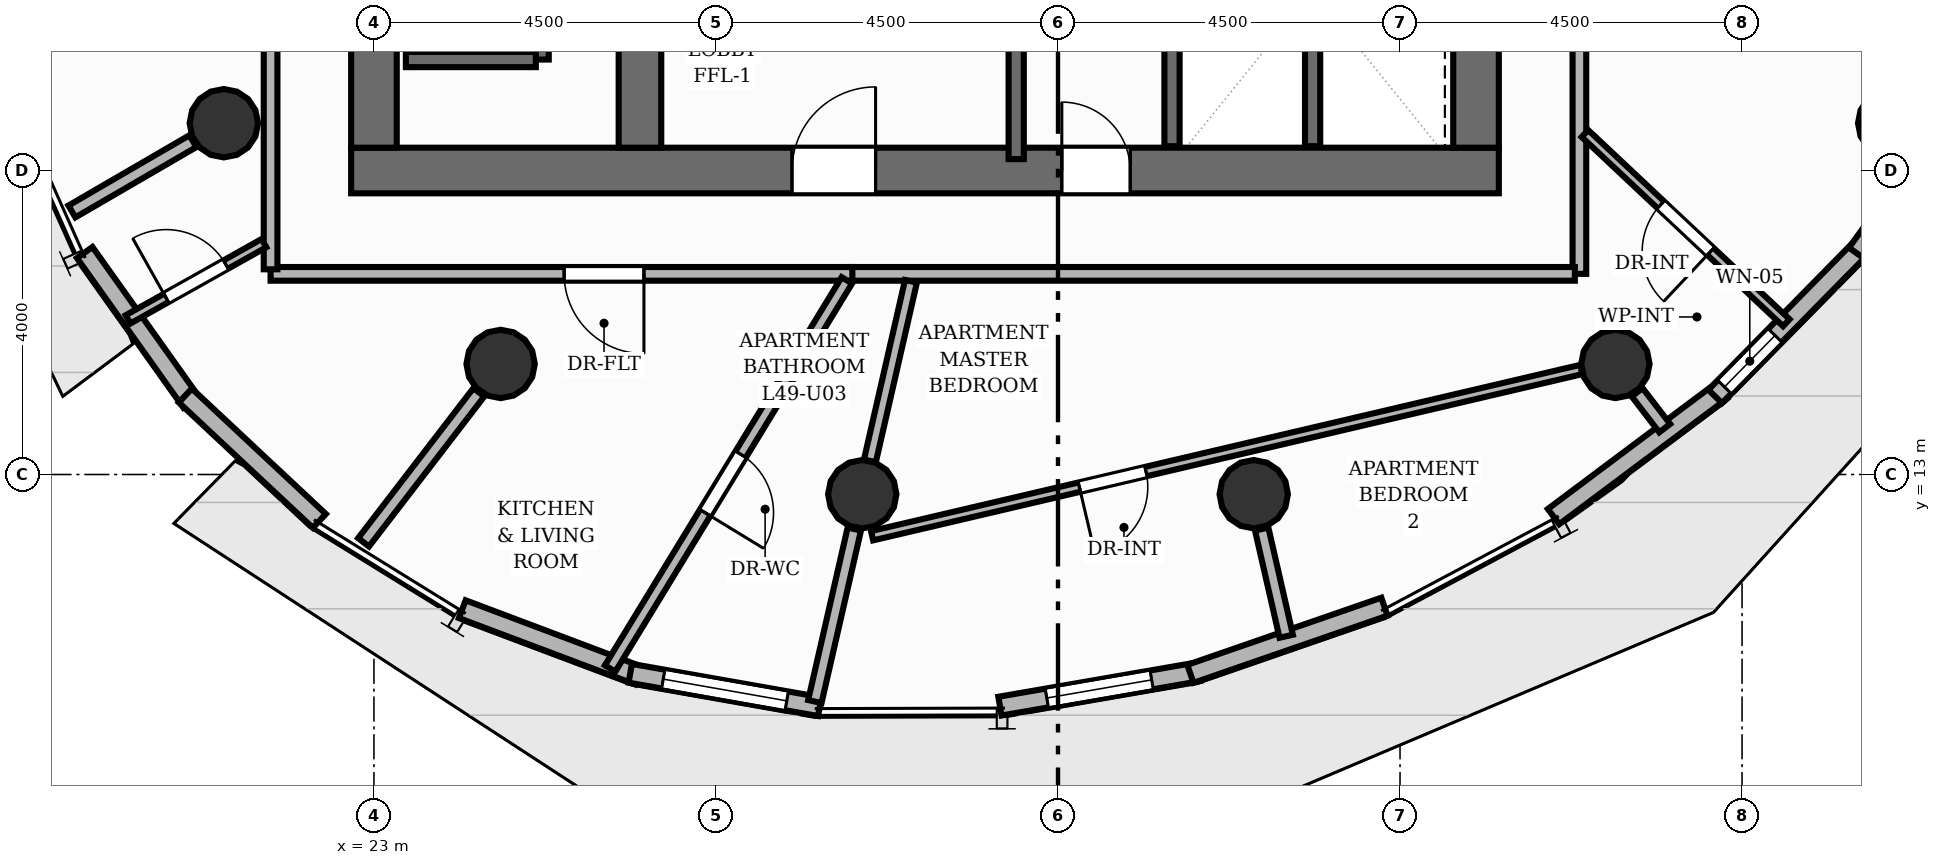
"""IFC4 building model, lengths in metres.
Left out: names, types, materials, properties, quantities, classifications, styles, units other than length and angle.
Written with IfcOpenShell. Run it as: python <this file> out.ifc"""

import sys

from ifc_helpers import new_model, si_unit, direction, frame, frame_2d, origin, origin_2d, place, context, subcontext, project, spatial, rectangle, circle, extrude, element, fill, save


model = new_model("IFC4")
c1 = context("Model", 3, precision=1e-05, world=origin(), true_north=direction((0.0, 1.0)))
c2 = subcontext(c1, "Body", "Model", "MODEL_VIEW")
j1 = project(units=[si_unit("LENGTHUNIT", "METRE"), si_unit("PLANEANGLEUNIT", "RADIAN")], contexts=[c1])
p1 = place(None, origin())
s1 = spatial("IfcSite", under=j1, at=p1, CompositionType="ELEMENT")
p2 = place(p1, origin())
s2 = spatial("IfcBuilding", under=s1, at=p2, CompositionType="ELEMENT")
p3 = place(p2, frame((0.0, 0.0, 166.24)))
s3 = spatial("IfcBuildingStorey", under=s2, at=p3, CompositionType="ELEMENT", Elevation=166.24)
p4 = place(p3, frame((22.7, 17.0, 0.0), z_axis=(0.0, 0.0, 1.0), x_axis=(1.0, 0.0, 0.0)))
e1 = element("IfcWall", 1, at=p4, inside=s3, PredefinedType="SHEAR", context=c2, shape_type="SweptSolid", body=[
    extrude(rectangle(XDim=15.1, YDim=0.6, at=frame_2d((7.55, 0.0))), origin(), (0.0, 0.0, 1.0), 3.2),
])
p5 = place(p4, frame((5.8, 0.0, 0.0)))
e2 = element("IfcOpeningElement", 2, at=p5, cuts=e1, PredefinedType="OPENING", context=c2, shape_type="SweptSolid", body=[
    extrude(rectangle(XDim=1.1, YDim=2.15, at=frame_2d((0.55, 1.075))), frame((0.0, 0.31, 0.0), z_axis=(0.0, -1.0, 0.0), x_axis=(1.0, 0.0, 0.0)), (0.0, 0.0, 1.0), 0.62),
])
p6 = place(p4, frame((9.35, 0.0, 0.0)))
e3 = element("IfcOpeningElement", 3, at=p6, cuts=e1, PredefinedType="OPENING", context=c2, shape_type="SweptSolid", body=[
    extrude(rectangle(XDim=0.9, YDim=2.1, at=frame_2d((0.45, 1.05))), frame((0.0, 0.31, 0.0), z_axis=(0.0, -1.0, 0.0), x_axis=(1.0, 0.0, 0.0)), (0.0, 0.0, 1.0), 0.62),
])
for number, where, z_axis, x_axis in (
    (4, (23.0, 17.3, 0.0), (0.0, 0.0, 1.0), (0.0, 1.0, 0.0)),
    (5, (37.5, 17.3, 0.0), (0.0, 0.0, 1.0), (0.0, 1.0, 0.0)),
):
    element("IfcWall", number, at=place(p3, frame(where, z_axis=z_axis, x_axis=x_axis)), inside=s3, PredefinedType="SHEAR", context=c2, shape_type="SweptSolid", body=[
        extrude(rectangle(XDim=13.4, YDim=0.6, at=frame_2d((6.7, 0.0))), origin(), (0.0, 0.0, 1.0), 3.2),
    ])
p7 = place(p3, frame((26.5, 17.3, 0.0), z_axis=(0.0, 0.0, 1.0), x_axis=(0.0, 1.0, 0.0)))
e6 = element("IfcWall", 6, at=p7, inside=s3, PredefinedType="SHEAR", context=c2, shape_type="SweptSolid", body=[
    extrude(rectangle(XDim=13.4, YDim=0.56, at=frame_2d((6.7, 0.0))), origin(), (0.0, 0.0, 1.0), 3.2),
])
for number, where, z_axis, x_axis in (
    (7, (21.025, 17.622, 0.0), (0.0, 0.0, 1.0), (1.0, 0.0, 0.0)),
    (8, (24.667, 14.455, 0.0), (0.0, 0.0, 1.0), (1.0, 0.0, 0.0)),
    (9, (29.425, 12.74, 0.0), (0.0, 0.0, 1.0), (1.0, 0.0, 0.0)),
    (10, (34.575, 12.74, 0.0), (0.0, 0.0, 1.0), (1.0, 0.0, 0.0)),
    (11, (39.333, 14.455, 0.0), (0.0, 0.0, 1.0), (1.0, 0.0, 0.0)),
    (12, (42.975, 17.622, 0.0), (0.0, 0.0, 1.0), (1.0, 0.0, 0.0)),
):
    element("IfcColumn", number, at=place(p3, frame(where, z_axis=z_axis, x_axis=x_axis)), inside=s3, PredefinedType="COLUMN", context=c2, shape_type="SweptSolid", body=[
        extrude(circle(Radius=0.45, at=origin_2d()), origin(), (0.0, 0.0, 1.0), 3.2),
    ])
p8 = place(p3, frame((20.594, 13.953, 0.0), z_axis=(0.0, 0.0, 1.0), x_axis=(-0.579505880656, 0.814968057217, 0.0)))
e13 = element("IfcWall", 13, at=p8, inside=s3, PredefinedType="SOLIDWALL", context=c2, shape_type="SweptSolid", body=[
    extrude(rectangle(XDim=2.415, YDim=0.25, at=frame_2d((1.208, 0.0))), origin(), (0.0, 0.0, 1.0), 2.96),
])
p9 = place(p3, frame((22.282, 12.389, 0.0), z_axis=(0.0, 0.0, 1.0), x_axis=(-0.730224222865, 0.683207570465, 0.0)))
e14 = element("IfcWall", 14, at=p9, inside=s3, PredefinedType="SOLIDWALL", context=c2, shape_type="SweptSolid", body=[
    extrude(rectangle(XDim=2.415, YDim=0.25, at=frame_2d((1.207, 0.0))), origin(), (0.0, 0.0, 1.0), 2.96),
])
p10 = place(p3, frame((26.481, 10.355, 0.0), z_axis=(0.0, 0.0, 1.0), x_axis=(-0.93586674787, 0.352354126172, 0.0)))
e15 = element("IfcWall", 15, at=p10, inside=s3, PredefinedType="SOLIDWALL", context=c2, shape_type="SweptSolid", body=[
    extrude(rectangle(XDim=2.478, YDim=0.25, at=frame_2d((1.239, 0.0))), origin(), (0.0, 0.0, 1.0), 2.96),
])
p11 = place(p3, frame((28.865, 9.945, 0.0), z_axis=(0.0, 0.0, 1.0), x_axis=(-0.984837873762, 0.173477267688, 0.0)))
e16 = element("IfcWall", 16, at=p11, inside=s3, PredefinedType="SOLIDWALL", context=c2, shape_type="SweptSolid", body=[
    extrude(rectangle(XDim=2.532, YDim=0.25, at=frame_2d((1.266, 0.0))), origin(), (0.0, 0.0, 1.0), 2.96),
])
p12 = place(p11, frame((0.441, 0.0, 0.85)))
e17 = element("IfcOpeningElement", 17, at=p12, cuts=e16, PredefinedType="OPENING", context=c2, shape_type="SweptSolid", body=[
    extrude(rectangle(XDim=1.65, YDim=1.55, at=frame_2d((0.825, 0.775))), frame((0.0, 0.135, 0.0), z_axis=(0.0, -1.0, 0.0), x_axis=(1.0, 0.0, 0.0)), (0.0, 0.0, 1.0), 0.27),
])
p13 = place(p3, frame((33.848, 10.405, 0.0), z_axis=(0.0, 0.0, 1.0), x_axis=(-0.985331154473, -0.170653203967, 0.0)))
e18 = element("IfcWall", 18, at=p13, inside=s3, PredefinedType="SOLIDWALL", context=c2, shape_type="SweptSolid", body=[
    extrude(rectangle(XDim=2.651, YDim=0.25, at=frame_2d((1.325, 0.0))), origin(), (0.0, 0.0, 1.0), 2.96),
])
p14 = place(p13, frame((0.625, 0.0, 0.85)))
e19 = element("IfcOpeningElement", 19, at=p14, cuts=e18, PredefinedType="OPENING", context=c2, shape_type="SweptSolid", body=[
    extrude(rectangle(XDim=1.4, YDim=1.55, at=frame_2d((0.7, 0.775))), frame((0.0, 0.135, 0.0), z_axis=(0.0, -1.0, 0.0), x_axis=(1.0, 0.0, 0.0)), (0.0, 0.0, 1.0), 0.27),
])
p15 = place(p3, frame((36.295, 11.261, 0.0), z_axis=(0.0, 0.0, 1.0), x_axis=(-0.945016150651, -0.327023661236, 0.0)))
e20 = element("IfcWall", 20, at=p15, inside=s3, PredefinedType="SOLIDWALL", context=c2, shape_type="SweptSolid", body=[
    extrude(rectangle(XDim=2.702, YDim=0.25, at=frame_2d((1.351, 0.0))), origin(), (0.0, 0.0, 1.0), 2.96),
])
p16 = place(p3, frame((40.728, 14.099, 0.0), z_axis=(0.0, 0.0, 1.0), x_axis=(-0.800636941996, -0.599149803564, 0.0)))
e21 = element("IfcWall", 21, at=p16, inside=s3, PredefinedType="SOLIDWALL", context=c2, shape_type="SweptSolid", body=[
    extrude(rectangle(XDim=2.758, YDim=0.25, at=frame_2d((1.379, 0.0))), origin(), (0.0, 0.0, 1.0), 2.96),
])
p17 = place(p3, frame((42.579, 15.995, 0.0), z_axis=(0.0, 0.0, 1.0), x_axis=(-0.700794099323, -0.713363603189, 0.0)))
e22 = element("IfcWall", 22, at=p17, inside=s3, PredefinedType="SOLIDWALL", context=c2, shape_type="SweptSolid", body=[
    extrude(rectangle(XDim=2.758, YDim=0.25, at=frame_2d((1.379, 0.0))), origin(), (0.0, 0.0, 1.0), 2.96),
])
p18 = place(p17, frame((1.633, 0.0, 0.85)))
e23 = element("IfcOpeningElement", 23, at=p18, cuts=e22, PredefinedType="OPENING", context=c2, shape_type="SweptSolid", body=[
    extrude(rectangle(XDim=0.95, YDim=1.45, at=frame_2d((0.475, 0.725))), frame((0.0, 0.135, 0.0), z_axis=(0.0, -1.0, 0.0), x_axis=(1.0, 0.0, 0.0)), (0.0, 0.0, 1.0), 0.27),
])
p19 = place(p3, frame((44.108, 18.135, 0.0), z_axis=(0.0, 0.0, 1.0), x_axis=(-0.583975860001, -0.811771023711, 0.0)))
e24 = element("IfcWall", 24, at=p19, inside=s3, PredefinedType="SOLIDWALL", context=c2, shape_type="SweptSolid", body=[
    extrude(rectangle(XDim=2.738, YDim=0.25, at=frame_2d((1.369, 0.0))), origin(), (0.0, 0.0, 1.0), 2.96),
])
p20 = place(p3, frame((31.45, 17.15, 0.0), z_axis=(0.0, 0.0, 1.0), x_axis=(0.0, 1.0, 0.0)))
e25 = element("IfcWall", 25, at=p20, inside=s3, PredefinedType="SHEAR", context=c2, shape_type="SweptSolid", body=[
    extrude(rectangle(XDim=3.5, YDim=0.2, at=frame_2d((1.75, 0.0))), origin(), (0.0, 0.0, 1.0), 3.2),
])
p21 = place(p3, frame((25.2, 18.46, 0.0), z_axis=(0.0, 0.0, 1.0), x_axis=(0.0, 1.0, 0.0)))
e26 = element("IfcWall", 26, at=p21, inside=s3, PredefinedType="SHEAR", context=c2, shape_type="SweptSolid", body=[
    extrude(rectangle(XDim=11.08, YDim=0.2, at=frame_2d((5.54, 0.0))), origin(), (0.0, 0.0, 1.0), 3.2),
])
p22 = place(p3, frame((23.42, 18.46, 0.0), z_axis=(0.0, 0.0, 1.0), x_axis=(1.0, 0.0, 0.0)))
e27 = element("IfcWall", 27, at=p22, inside=s3, PredefinedType="SHEAR", context=c2, shape_type="SweptSolid", body=[
    extrude(rectangle(XDim=1.71, YDim=0.2, at=frame_2d((0.855, 0.0))), origin(), (0.0, 0.0, 1.0), 3.2),
])
for number, where, z_axis, x_axis in (
    (28, (33.5, 17.32, 0.0), (0.0, 0.0, 1.0), (0.0, 1.0, 0.0)),
    (29, (35.35, 17.32, 0.0), (0.0, 0.0, 1.0), (0.0, 1.0, 0.0)),
):
    element("IfcWall", number, at=place(p3, frame(where, z_axis=z_axis, x_axis=x_axis)), inside=s3, PredefinedType="SHEAR", context=c2, shape_type="SweptSolid", body=[
        extrude(rectangle(XDim=1.86, YDim=0.2, at=frame_2d((0.93, 0.0))), origin(), (0.0, 0.0, 1.0), 3.2),
    ])
p23 = place(p3, frame((20.618, 17.386, 0.0), z_axis=(0.0, 0.0, 1.0), x_axis=(-0.864604991586, -0.502452195264, 0.0)))
e30 = element("IfcWall", 30, at=p23, inside=s3, PredefinedType="PARTITIONING", context=c2, shape_type="SweptSolid", body=[
    extrude(rectangle(XDim=1.841, YDim=0.18, at=frame_2d((0.92, 0.0))), origin(), (0.0, 0.0, 1.0), 2.403),
])
p24 = place(p3, frame((24.38, 14.082, 0.0), z_axis=(0.0, 0.0, 1.0), x_axis=(-0.609279402228, -0.792955616678, 0.0)))
e31 = element("IfcWall", 31, at=p24, inside=s3, PredefinedType="PARTITIONING", context=c2, shape_type="SweptSolid", body=[
    extrude(rectangle(XDim=2.49, YDim=0.18, at=frame_2d((1.245, 0.0))), origin(), (0.0, 0.0, 1.0), 2.403),
])
p25 = place(p3, frame((29.32, 12.282, 0.0), z_axis=(0.0, 0.0, 1.0), x_axis=(-0.222998449778, -0.974818799263, 0.0)))
e32 = element("IfcWall", 32, at=p25, inside=s3, PredefinedType="PARTITIONING", context=c2, shape_type="SweptSolid", body=[
    extrude(rectangle(XDim=2.329, YDim=0.18, at=frame_2d((1.164, 0.0))), origin(), (0.0, 0.0, 1.0), 2.403),
])
p26 = place(p3, frame((34.68, 12.282, 0.0), z_axis=(0.0, 0.0, 1.0), x_axis=(0.22299884629, -0.974818708557, 0.0)))
e33 = element("IfcWall", 33, at=p26, inside=s3, PredefinedType="PARTITIONING", context=c2, shape_type="SweptSolid", body=[
    extrude(rectangle(XDim=1.447, YDim=0.18, at=frame_2d((0.724, 0.0))), origin(), (0.0, 0.0, 1.0), 2.403),
])
p27 = place(p3, frame((39.62, 14.082, 0.0), z_axis=(0.0, 0.0, 1.0), x_axis=(0.609274747308, -0.792959193334, 0.0)))
e34 = element("IfcWall", 34, at=p27, inside=s3, PredefinedType="PARTITIONING", context=c2, shape_type="SweptSolid", body=[
    extrude(rectangle(XDim=0.595, YDim=0.18, at=frame_2d((0.298, 0.0))), origin(), (0.0, 0.0, 1.0), 2.403),
])
p28 = place(p3, frame((38.86, 32.36, 0.0), z_axis=(0.0, 0.0, 1.0), x_axis=(0.0, -1.0, 0.0)))
e35 = element("IfcWall", 35, at=p28, inside=s3, PredefinedType="PARTITIONING", context=c2, shape_type="SweptSolid", body=[
    extrude(rectangle(XDim=16.72, YDim=0.18, at=frame_2d((8.36, 0.0))), origin(), (0.0, 0.0, 1.0), 2.955),
])
p29 = place(p28, frame((11.899, 0.0, 0.0)))
e36 = element("IfcOpeningElement", 36, at=p29, cuts=e35, PredefinedType="OPENING", context=c2, shape_type="SweptSolid", body=[
    extrude(rectangle(XDim=1.05, YDim=2.15, at=frame_2d((0.525, 1.075))), frame((0.0, 0.1, 0.0), z_axis=(0.0, -1.0, 0.0), x_axis=(1.0, 0.0, 0.0)), (0.0, 0.0, 1.0), 0.2),
])
p30 = place(p3, frame((38.8, 15.64, 0.0), z_axis=(0.0, 0.0, 1.0), x_axis=(-1.0, 0.0, 0.0)))
e37 = element("IfcWall", 37, at=p30, inside=s3, PredefinedType="PARTITIONING", context=c2, shape_type="SweptSolid", body=[
    extrude(rectangle(XDim=9.549, YDim=0.18, at=frame_2d((4.774, 0.0))), origin(), (0.0, 0.0, 1.0), 2.955),
])
p31 = place(p3, frame((29.294, 15.64, 0.0), z_axis=(0.0, 0.0, 1.0), x_axis=(-1.0, 0.0, 0.0)))
e38 = element("IfcWall", 38, at=p31, inside=s3, PredefinedType="PARTITIONING", context=c2, shape_type="SweptSolid", body=[
    extrude(rectangle(XDim=7.655, YDim=0.18, at=frame_2d((3.827, 0.0))), origin(), (0.0, 0.0, 1.0), 2.955),
])
p32 = place(p31, frame((2.742, 0.0, 0.0)))
e39 = element("IfcOpeningElement", 39, at=p32, cuts=e38, PredefinedType="OPENING", context=c2, shape_type="SweptSolid", body=[
    extrude(rectangle(XDim=1.05, YDim=2.15, at=frame_2d((0.525, 1.075))), frame((0.0, 0.1, 0.0), z_axis=(0.0, -1.0, 0.0), x_axis=(1.0, 0.0, 0.0)), (0.0, 0.0, 1.0), 0.2),
])
p33 = place(p3, frame((21.64, 15.7, 0.0), z_axis=(0.0, 0.0, 1.0), x_axis=(0.0, 1.0, 0.0)))
e40 = element("IfcWall", 40, at=p33, inside=s3, PredefinedType="PARTITIONING", context=c2, shape_type="SweptSolid", body=[
    extrude(rectangle(XDim=16.592, YDim=0.18, at=frame_2d((8.296, 0.0))), origin(), (0.0, 0.0, 1.0), 2.955),
])
p34 = place(p3, frame((41.583, 14.997, 0.0), z_axis=(0.0, 0.0, 1.0), x_axis=(-0.728822684094, 0.684702486596, 0.0)))
e41 = element("IfcWall", 41, at=p34, inside=s3, PredefinedType="PARTITIONING", context=c2, shape_type="SweptSolid", body=[
    extrude(rectangle(XDim=3.635, YDim=0.125, at=frame_2d((1.818, 0.0))), origin(), (0.0, 0.0, 1.0), 2.955),
])
p35 = place(p34, frame((1.368, 0.0, 0.0)))
e42 = element("IfcOpeningElement", 42, at=p35, cuts=e41, PredefinedType="OPENING", context=c2, shape_type="SweptSolid", body=[
    extrude(rectangle(XDim=0.9, YDim=2.1, at=frame_2d((0.45, 1.05))), frame((0.0, 0.073, 0.0), z_axis=(0.0, -1.0, 0.0), x_axis=(1.0, 0.0, 0.0)), (0.0, 0.0, 1.0), 0.145),
])
p36 = place(p3, frame((38.884, 14.382, 0.0), z_axis=(0.0, 0.0, 1.0), x_axis=(-0.973598619929, -0.228266789684, 0.0)))
e43 = element("IfcWall", 43, at=p36, inside=s3, PredefinedType="PARTITIONING", context=c2, shape_type="SweptSolid", body=[
    extrude(rectangle(XDim=9.583, YDim=0.125, at=frame_2d((4.792, 0.0))), origin(), (0.0, 0.0, 1.0), 2.488),
])
p37 = place(p36, frame((5.882, 0.0, 0.0)))
e44 = element("IfcOpeningElement", 44, at=p37, cuts=e43, PredefinedType="OPENING", context=c2, shape_type="SweptSolid", body=[
    extrude(rectangle(XDim=0.9, YDim=2.1, at=frame_2d((0.45, 1.05))), frame((0.0, 0.073, 0.0), z_axis=(0.0, -1.0, 0.0), x_axis=(1.0, 0.0, 0.0)), (0.0, 0.0, 1.0), 0.145),
])
p38 = place(p3, frame((29.525, 13.179, 0.0), z_axis=(0.0, 0.0, 1.0), x_axis=(0.222961521006, 0.974827246311, 0.0)))
e45 = element("IfcWall", 45, at=p38, inside=s3, PredefinedType="PLUMBINGWALL", context=c2, shape_type="SweptSolid", body=[
    extrude(rectangle(XDim=2.424, YDim=0.16, at=frame_2d((1.212, 0.0))), origin(), (0.0, 0.0, 1.0), 2.403),
])
p39 = place(p3, frame((29.222, 15.555, 0.0), z_axis=(0.0, 0.0, 1.0), x_axis=(-0.520771396371, -0.8536961712, 0.0)))
e46 = element("IfcWall", 46, at=p39, inside=s3, PredefinedType="PLUMBINGWALL", context=c2, shape_type="SweptSolid", body=[
    extrude(rectangle(XDim=5.982, YDim=0.16, at=frame_2d((2.991, 0.0))), origin(), (0.0, 0.0, 1.0), 2.692),
])
p40 = place(p39, frame((2.681, 0.0, 0.0)))
e47 = element("IfcOpeningElement", 47, at=p40, cuts=e46, PredefinedType="OPENING", context=c2, shape_type="SweptSolid", body=[
    extrude(rectangle(XDim=0.9, YDim=2.1, at=frame_2d((0.45, 1.05))), frame((0.0, 0.09, 0.0), z_axis=(0.0, -1.0, 0.0), x_axis=(1.0, 0.0, 0.0)), (0.0, 0.0, 1.0), 0.18),
])
p41 = place(p3, frame((19.765, 15.041, 0.0), z_axis=(0.0, 0.0, 1.0), x_axis=(0.872144280578, 0.489248764798, 0.0)))
e48 = element("IfcWall", 48, at=p41, inside=s3, PredefinedType="PARTITIONING", context=c2, shape_type="SweptSolid", body=[
    extrude(rectangle(XDim=2.05, YDim=0.125, at=frame_2d((1.025, 0.0))), origin(), (0.0, 0.0, 1.0), 2.955),
])
p42 = place(p41, frame((0.575, 0.0, 0.0)))
e49 = element("IfcOpeningElement", 49, at=p42, cuts=e48, PredefinedType="OPENING", context=c2, shape_type="SweptSolid", body=[
    extrude(rectangle(XDim=0.9, YDim=2.1, at=frame_2d((0.45, 1.05))), frame((0.0, 0.073, 0.0), z_axis=(0.0, -1.0, 0.0), x_axis=(1.0, 0.0, 0.0)), (0.0, 0.0, 1.0), 0.145),
])
p43 = place(p12, origin())
e50 = element("IfcWindow", 50, at=p43, inside=s3, PartitioningType="SINGLE_PANEL", PredefinedType="WINDOW", context=c2, shape_type="SweptSolid", body=[
    extrude(rectangle(XDim=1.65, YDim=1.55, at=frame_2d((0.825, 0.775))), frame((0.0, 0.03, 0.0), z_axis=(0.0, -1.0, 0.0), x_axis=(1.0, 0.0, 0.0)), (0.0, 0.0, 1.0), 0.06),
])
fill(e17, e50)
p44 = place(p14, origin())
e51 = element("IfcWindow", 51, at=p44, inside=s3, PartitioningType="SINGLE_PANEL", PredefinedType="WINDOW", context=c2, shape_type="SweptSolid", body=[
    extrude(rectangle(XDim=1.4, YDim=1.55, at=frame_2d((0.7, 0.775))), frame((0.0, 0.03, 0.0), z_axis=(0.0, -1.0, 0.0), x_axis=(1.0, 0.0, 0.0)), (0.0, 0.0, 1.0), 0.06),
])
fill(e19, e51)
p45 = place(p18, origin())
e52 = element("IfcWindow", 52, at=p45, inside=s3, PartitioningType="SINGLE_PANEL", PredefinedType="WINDOW", context=c2, shape_type="SweptSolid", body=[
    extrude(rectangle(XDim=0.95, YDim=1.45, at=frame_2d((0.475, 0.725))), frame((0.0, 0.03, 0.0), z_axis=(0.0, -1.0, 0.0), x_axis=(1.0, 0.0, 0.0)), (0.0, 0.0, 1.0), 0.06),
])
fill(e23, e52)
p46 = place(p5, origin())
e53 = element("IfcDoor", 53, at=p46, inside=s3, OperationType="SINGLE_SWING_RIGHT", PredefinedType="DOOR", context=c2, shape_type="SweptSolid", body=[
    extrude(rectangle(XDim=1.1, YDim=2.15, at=frame_2d((0.55, 1.075))), frame((0.0, 0.025, 0.0), z_axis=(0.0, -1.0, 0.0), x_axis=(1.0, 0.0, 0.0)), (0.0, 0.0, 1.0), 0.05),
])
fill(e2, e53)
p47 = place(p6, origin())
e54 = element("IfcDoor", 54, at=p47, inside=s3, OperationType="SINGLE_SWING_LEFT", PredefinedType="DOOR", context=c2, shape_type="SweptSolid", body=[
    extrude(rectangle(XDim=0.9, YDim=2.1, at=frame_2d((0.45, 1.05))), frame((0.0, 0.025, 0.0), z_axis=(0.0, -1.0, 0.0), x_axis=(1.0, 0.0, 0.0)), (0.0, 0.0, 1.0), 0.05),
])
fill(e3, e54)
p48 = place(p35, origin())
e55 = element("IfcDoor", 55, at=p48, inside=s3, OperationType="SINGLE_SWING_LEFT", PredefinedType="DOOR", context=c2, shape_type="SweptSolid", body=[
    extrude(rectangle(XDim=0.9, YDim=2.1, at=frame_2d((0.45, 1.05))), frame((0.0, 0.025, 0.0), z_axis=(0.0, -1.0, 0.0), x_axis=(1.0, 0.0, 0.0)), (0.0, 0.0, 1.0), 0.05),
])
fill(e42, e55)
p49 = place(p37, origin())
e56 = element("IfcDoor", 56, at=p49, inside=s3, OperationType="SINGLE_SWING_RIGHT", PredefinedType="DOOR", context=c2, shape_type="SweptSolid", body=[
    extrude(rectangle(XDim=0.9, YDim=2.1, at=frame_2d((0.45, 1.05))), frame((0.0, 0.025, 0.0), z_axis=(0.0, -1.0, 0.0), x_axis=(1.0, 0.0, 0.0)), (0.0, 0.0, 1.0), 0.05),
])
fill(e44, e56)
p50 = place(p32, origin())
e57 = element("IfcDoor", 57, at=p50, inside=s3, OperationType="SINGLE_SWING_LEFT", PredefinedType="DOOR", context=c2, shape_type="SweptSolid", body=[
    extrude(rectangle(XDim=1.05, YDim=2.15, at=frame_2d((0.525, 1.075))), frame((0.0, 0.025, 0.0), z_axis=(0.0, -1.0, 0.0), x_axis=(1.0, 0.0, 0.0)), (0.0, 0.0, 1.0), 0.05),
])
fill(e39, e57)
p51 = place(p40, origin())
e58 = element("IfcDoor", 58, at=p51, inside=s3, OperationType="SINGLE_SWING_RIGHT", PredefinedType="DOOR", context=c2, shape_type="SweptSolid", body=[
    extrude(rectangle(XDim=0.9, YDim=2.1, at=frame_2d((0.45, 1.05))), frame((0.0, 0.025, 0.0), z_axis=(0.0, -1.0, 0.0), x_axis=(1.0, 0.0, 0.0)), (0.0, 0.0, 1.0), 0.05),
])
fill(e47, e58)
p52 = place(p42, origin())
e59 = element("IfcDoor", 59, at=p52, inside=s3, OperationType="SINGLE_SWING_LEFT", PredefinedType="DOOR", context=c2, shape_type="SweptSolid", body=[
    extrude(rectangle(XDim=0.9, YDim=2.1, at=frame_2d((0.45, 1.05))), frame((0.0, 0.025, 0.0), z_axis=(0.0, -1.0, 0.0), x_axis=(1.0, 0.0, 0.0)), (0.0, 0.0, 1.0), 0.05),
])
fill(e49, e59)
save(model, sys.argv[1])
